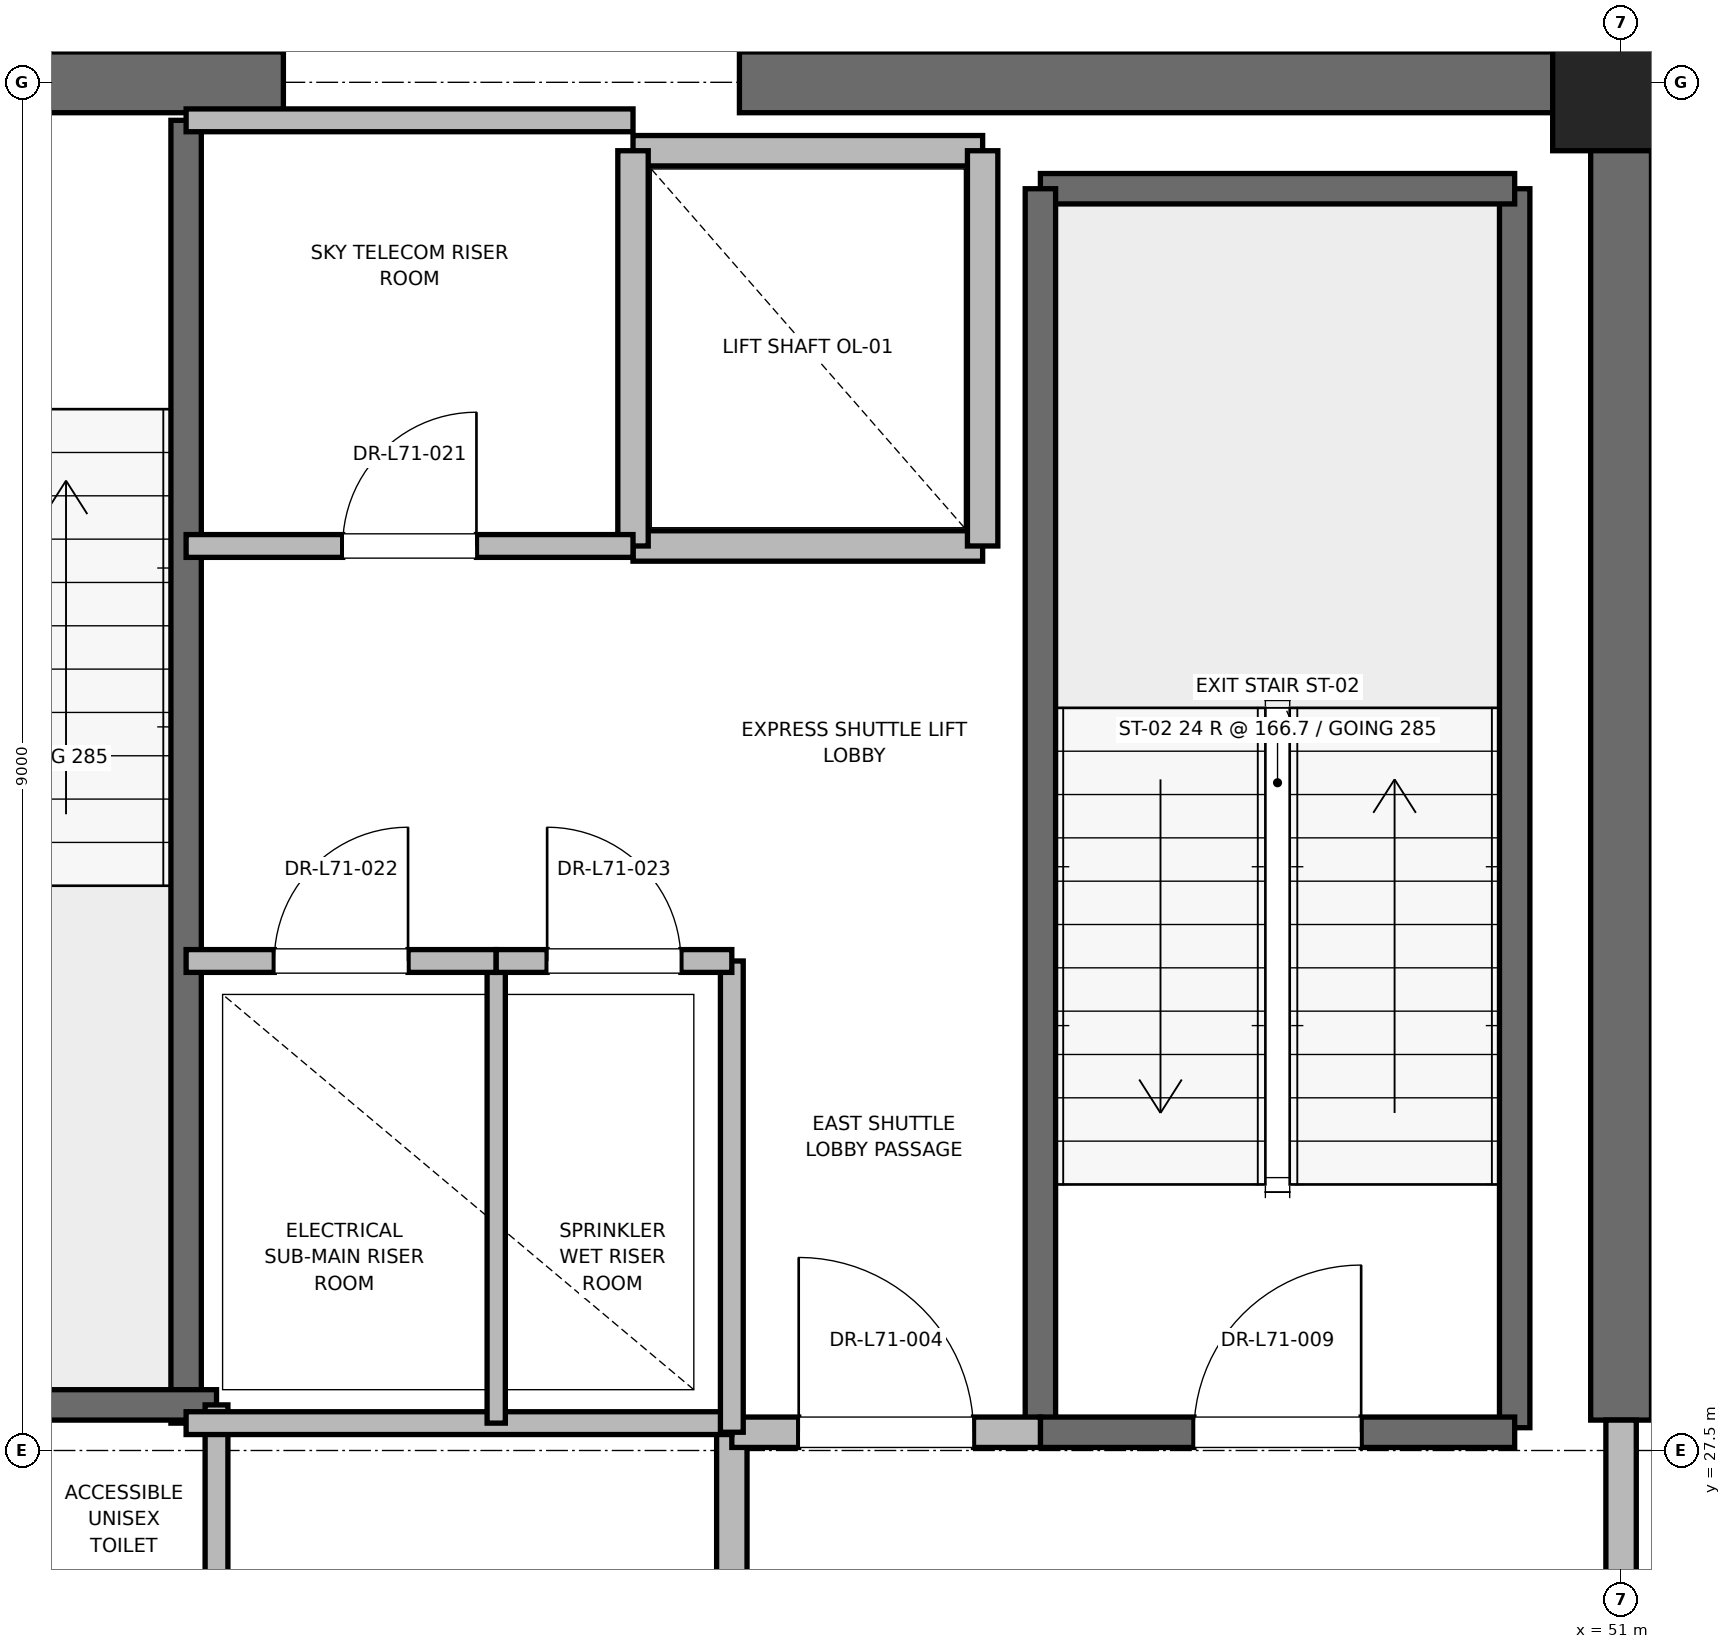
"""IFC4 building model, lengths in metres.
Left out: names, types, materials, properties, quantities, classifications, styles, units other than length and angle.
Written with IfcOpenShell. Run it as: python <this file> out.ifc"""

import sys

from ifc_helpers import new_model, si_unit, direction, frame, frame_2d, origin, origin_2d, place, context, subcontext, project, spatial, rectangle, extrude, element, fill, save


model = new_model("IFC4")
c1 = context("Model", 3, precision=1e-05, world=origin(), true_north=direction((0.0, 1.0)))
c2 = subcontext(c1, "Body", "Model", "MODEL_VIEW")
j1 = project(units=[si_unit("LENGTHUNIT", "METRE"), si_unit("PLANEANGLEUNIT", "RADIAN")], contexts=[c1])
p1 = place(None, origin())
s1 = spatial("IfcSite", under=j1, at=p1, CompositionType="ELEMENT")
p2 = place(p1, origin())
s2 = spatial("IfcBuilding", under=s1, at=p2, CompositionType="ELEMENT")
p3 = place(p2, frame((0.0, 0.0, 306.8)))
s3 = spatial("IfcBuildingStorey", under=s2, at=p3, CompositionType="ELEMENT", Elevation=306.8)
p4 = place(p3, frame((51.0, 36.5, 0.0), z_axis=(0.0, 0.0, 1.0), x_axis=(1.0, 0.0, 0.0)))
e1 = element("IfcColumn", 1, at=p4, inside=s3, PredefinedType="PILASTER", context=c2, shape_type="SweptSolid", body=[
    extrude(rectangle(XDim=0.9, YDim=0.9, at=origin_2d()), origin(), (0.0, 0.0, 1.0), 4.0),
])
p5 = place(p3, frame((37.8, 36.5, 0.0), z_axis=(0.0, 0.0, 1.0), x_axis=(1.0, 0.0, 0.0)))
e2 = element("IfcWall", 2, at=p5, inside=s3, PredefinedType="SHEAR", context=c2, shape_type="SweptSolid", body=[
    extrude(rectangle(XDim=4.4, YDim=0.4, at=frame_2d((2.2, 0.0))), origin(), (0.0, 0.0, 1.0), 3.785),
])
p6 = place(p5, frame((1.65, 0.0, 0.0)))
e3 = element("IfcOpeningElement", 3, at=p6, cuts=e2, PredefinedType="OPENING", context=c2, shape_type="SweptSolid", body=[
    extrude(rectangle(XDim=1.1, YDim=2.15, at=frame_2d((0.55, 1.075))), frame((0.0, 0.2, 0.0), z_axis=(0.0, -1.0, 0.0), x_axis=(1.0, 0.0, 0.0)), (0.0, 0.0, 1.0), 0.4),
])
p7 = place(p3, frame((45.2, 36.5, 0.0), z_axis=(0.0, 0.0, 1.0), x_axis=(1.0, 0.0, 0.0)))
e4 = element("IfcWall", 4, at=p7, inside=s3, PredefinedType="SHEAR", context=c2, shape_type="SweptSolid", body=[
    extrude(rectangle(XDim=5.8, YDim=0.4, at=frame_2d((2.9, 0.0))), origin(), (0.0, 0.0, 1.0), 3.785),
])
p8 = place(p3, frame((51.0, 27.7, 0.0), z_axis=(0.0, 0.0, 1.0), x_axis=(0.0, 1.0, 0.0)))
e5 = element("IfcWall", 5, at=p8, inside=s3, PredefinedType="SHEAR", context=c2, shape_type="SweptSolid", body=[
    extrude(rectangle(XDim=8.8, YDim=0.4, at=frame_2d((4.4, 0.0))), origin(), (0.0, 0.0, 1.0), 3.785),
])
p9 = place(p3, frame((50.3, 27.65, 0.0), z_axis=(0.0, 0.0, 1.0), x_axis=(0.0, 1.0, 0.0)))
e6 = element("IfcWall", 6, at=p9, inside=s3, PredefinedType="SOLIDWALL", context=c2, shape_type="SweptSolid", body=[
    extrude(rectangle(XDim=8.15, YDim=0.2, at=frame_2d((4.075, 0.0))), origin(), (0.0, 0.0, 1.0), 3.785),
])
p10 = place(p3, frame((47.18, 35.8, 0.0), z_axis=(0.0, 0.0, 1.0), x_axis=(1.0, 0.0, 0.0)))
e7 = element("IfcWall", 7, at=p10, inside=s3, PredefinedType="SOLIDWALL", context=c2, shape_type="SweptSolid", body=[
    extrude(rectangle(XDim=3.12, YDim=0.2, at=frame_2d((1.56, 0.0))), origin(), (0.0, 0.0, 1.0), 3.785),
])
p11 = place(p3, frame((47.18, 27.62, 0.0), z_axis=(0.0, 0.0, 1.0), x_axis=(0.0, 1.0, 0.0)))
e8 = element("IfcWall", 8, at=p11, inside=s3, PredefinedType="SOLIDWALL", context=c2, shape_type="SweptSolid", body=[
    extrude(rectangle(XDim=8.18, YDim=0.2, at=frame_2d((4.09, 0.0))), origin(), (0.0, 0.0, 1.0), 3.785),
])
p12 = place(p3, frame((47.18, 27.62, 0.0), z_axis=(0.0, 0.0, 1.0), x_axis=(1.0, 0.0, 0.0)))
e9 = element("IfcWall", 9, at=p12, inside=s3, PredefinedType="SOLIDWALL", context=c2, shape_type="SweptSolid", body=[
    extrude(rectangle(XDim=3.12, YDim=0.2, at=frame_2d((1.56, 0.0))), origin(), (0.0, 0.0, 1.0), 3.785),
])
p13 = place(p12, frame((1.01, 0.0, 0.0)))
e10 = element("IfcOpeningElement", 10, at=p13, cuts=e9, PredefinedType="OPENING", context=c2, shape_type="SweptSolid", body=[
    extrude(rectangle(XDim=1.1, YDim=2.15, at=frame_2d((0.55, 1.075))), frame((0.0, 0.1, 0.0), z_axis=(0.0, -1.0, 0.0), x_axis=(1.0, 0.0, 0.0)), (0.0, 0.0, 1.0), 0.2),
])
p14 = place(p3, frame((41.56, 27.68, 0.0), z_axis=(0.0, 0.0, 1.0), x_axis=(0.0, 1.0, 0.0)))
e11 = element("IfcWall", 11, at=p14, inside=s3, PredefinedType="SOLIDWALL", context=c2, shape_type="SweptSolid", body=[
    extrude(rectangle(XDim=8.57, YDim=0.2, at=frame_2d((4.285, 0.0))), origin(), (0.0, 0.0, 1.0), 3.785),
])
p15 = place(p3, frame((38.44, 27.8, 0.0), z_axis=(0.0, 0.0, 1.0), x_axis=(1.0, 0.0, 0.0)))
e12 = element("IfcWall", 12, at=p15, inside=s3, PredefinedType="SOLIDWALL", context=c2, shape_type="SweptSolid", body=[
    extrude(rectangle(XDim=3.32, YDim=0.2, at=frame_2d((1.66, 0.0))), origin(), (0.0, 0.0, 1.0), 3.785),
])
p16 = place(p3, frame((45.15, 24.25, 0.0), z_axis=(0.0, 0.0, 1.0), x_axis=(0.0, 1.0, 0.0)))
e13 = element("IfcWall", 13, at=p16, inside=s3, PredefinedType="PARTITIONING", context=c2, shape_type="SweptSolid", body=[
    extrude(rectangle(XDim=3.37, YDim=0.2, at=frame_2d((1.685, 0.0))), origin(), (0.0, 0.0, 1.0), 3.785),
])
p17 = place(p3, frame((45.15, 27.62, 0.0), z_axis=(0.0, 0.0, 1.0), x_axis=(1.0, 0.0, 0.0)))
e14 = element("IfcWall", 14, at=p17, inside=s3, PredefinedType="PARTITIONING", context=c2, shape_type="SweptSolid", body=[
    extrude(rectangle(XDim=2.03, YDim=0.2, at=frame_2d((1.015, 0.0))), origin(), (0.0, 0.0, 1.0), 3.785),
])
p18 = place(p17, frame((0.44, 0.0, 0.0)))
e15 = element("IfcOpeningElement", 15, at=p18, cuts=e14, PredefinedType="OPENING", context=c2, shape_type="SweptSolid", body=[
    extrude(rectangle(XDim=1.15, YDim=2.2, at=frame_2d((0.575, 1.1))), frame((0.0, 0.1, 0.0), z_axis=(0.0, -1.0, 0.0), x_axis=(1.0, 0.0, 0.0)), (0.0, 0.0, 1.0), 0.2),
])
p19 = place(p3, frame((51.0, 24.3, 0.0), z_axis=(0.0, 0.0, 1.0), x_axis=(0.0, 1.0, 0.0)))
e16 = element("IfcWall", 16, at=p19, inside=s3, PredefinedType="PARTITIONING", context=c2, shape_type="SweptSolid", body=[
    extrude(rectangle(XDim=3.4, YDim=0.2, at=frame_2d((1.7, 0.0))), origin(), (0.0, 0.0, 1.0), 2.865),
])
p20 = place(p19, frame((1.125, 0.0, 0.0)))
e17 = element("IfcOpeningElement", 17, at=p20, cuts=e16, PredefinedType="OPENING", context=c2, shape_type="SweptSolid", body=[
    extrude(rectangle(XDim=1.15, YDim=2.2, at=frame_2d((0.575, 1.1))), frame((0.0, 0.1, 0.0), z_axis=(0.0, -1.0, 0.0), x_axis=(1.0, 0.0, 0.0)), (0.0, 0.0, 1.0), 0.2),
])
p21 = place(p3, frame((44.5, 33.45, 0.0), z_axis=(0.0, 0.0, 1.0), x_axis=(1.0, 0.0, 0.0)))
e18 = element("IfcWall", 18, at=p21, inside=s3, PredefinedType="SOLIDWALL", context=c2, shape_type="SweptSolid", body=[
    extrude(rectangle(XDim=2.3, YDim=0.2, at=frame_2d((1.15, 0.0))), origin(), (0.0, 0.0, 1.0), 3.785),
])
p22 = place(p3, frame((46.8, 36.05, 0.0), z_axis=(0.0, 0.0, 1.0), x_axis=(-1.0, 0.0, 0.0)))
e19 = element("IfcWall", 19, at=p22, inside=s3, PredefinedType="SOLIDWALL", context=c2, shape_type="SweptSolid", body=[
    extrude(rectangle(XDim=2.3, YDim=0.2, at=frame_2d((1.15, 0.0))), origin(), (0.0, 0.0, 1.0), 2.865),
])
p23 = place(p3, frame((44.5, 36.05, 0.0), z_axis=(0.0, 0.0, 1.0), x_axis=(0.0, -1.0, 0.0)))
e20 = element("IfcWall", 20, at=p23, inside=s3, PredefinedType="SOLIDWALL", context=c2, shape_type="SweptSolid", body=[
    extrude(rectangle(XDim=2.6, YDim=0.2, at=frame_2d((1.3, 0.0))), origin(), (0.0, 0.0, 1.0), 2.865),
])
p24 = place(p3, frame((46.8, 33.45, 0.0), z_axis=(0.0, 0.0, 1.0), x_axis=(0.0, 1.0, 0.0)))
e21 = element("IfcWall", 21, at=p24, inside=s3, PredefinedType="SOLIDWALL", context=c2, shape_type="SweptSolid", body=[
    extrude(rectangle(XDim=2.6, YDim=0.2, at=frame_2d((1.3, 0.0))), origin(), (0.0, 0.0, 1.0), 3.785),
])
p25 = place(p3, frame((41.76, 23.8, 0.0), z_axis=(0.0, 0.0, 1.0), x_axis=(0.0, 1.0, 0.0)))
e22 = element("IfcWall", 22, at=p25, inside=s3, PredefinedType="PARTITIONING", context=c2, shape_type="SweptSolid", body=[
    extrude(rectangle(XDim=4.0, YDim=0.15, at=frame_2d((2.0, 0.0))), origin(), (0.0, 0.0, 1.0), 2.85),
])
p26 = place(p3, frame((41.56, 27.68, 0.0), z_axis=(0.0, 0.0, 1.0), x_axis=(1.0, 0.0, 0.0)))
e23 = element("IfcWall", 23, at=p26, inside=s3, PredefinedType="PARTITIONING", context=c2, shape_type="SweptSolid", body=[
    extrude(rectangle(XDim=3.59, YDim=0.15, at=frame_2d((1.795, 0.0))), origin(), (0.0, 0.0, 1.0), 2.85),
])
p27 = place(p3, frame((45.15, 27.62, 0.0), z_axis=(0.0, 0.0, 1.0), x_axis=(0.0, 1.0, 0.0)))
e24 = element("IfcWall", 24, at=p27, inside=s3, PredefinedType="PARTITIONING", context=c2, shape_type="SweptSolid", body=[
    extrude(rectangle(XDim=3.1, YDim=0.15, at=frame_2d((1.55, 0.0))), origin(), (0.0, 0.0, 1.0), 2.85),
])
p28 = place(p3, frame((43.6, 27.68, 0.0), z_axis=(0.0, 0.0, 1.0), x_axis=(0.0, 1.0, 0.0)))
e25 = element("IfcWall", 25, at=p28, inside=s3, PredefinedType="PARTITIONING", context=c2, shape_type="SweptSolid", body=[
    extrude(rectangle(XDim=3.04, YDim=0.12, at=frame_2d((1.52, 0.0))), origin(), (0.0, 0.0, 1.0), 2.85),
])
p29 = place(p3, frame((41.56, 30.72, 0.0), z_axis=(0.0, 0.0, 1.0), x_axis=(1.0, 0.0, 0.0)))
e26 = element("IfcWall", 26, at=p29, inside=s3, PredefinedType="PARTITIONING", context=c2, shape_type="SweptSolid", body=[
    extrude(rectangle(XDim=2.04, YDim=0.15, at=frame_2d((1.02, 0.0))), origin(), (0.0, 0.0, 1.0), 2.85),
])
p30 = place(p29, frame((0.58, 0.0, 0.0)))
e27 = element("IfcOpeningElement", 27, at=p30, cuts=e26, PredefinedType="OPENING", context=c2, shape_type="SweptSolid", body=[
    extrude(rectangle(XDim=0.88, YDim=2.1, at=frame_2d((0.44, 1.05))), frame((0.0, 0.075, 0.0), z_axis=(0.0, -1.0, 0.0), x_axis=(1.0, 0.0, 0.0)), (0.0, 0.0, 1.0), 0.15),
])
p31 = place(p3, frame((43.6, 30.72, 0.0), z_axis=(0.0, 0.0, 1.0), x_axis=(1.0, 0.0, 0.0)))
e28 = element("IfcWall", 28, at=p31, inside=s3, PredefinedType="PARTITIONING", context=c2, shape_type="SweptSolid", body=[
    extrude(rectangle(XDim=1.55, YDim=0.15, at=frame_2d((0.775, 0.0))), origin(), (0.0, 0.0, 1.0), 2.85),
])
p32 = place(p31, frame((0.335, 0.0, 0.0)))
e29 = element("IfcOpeningElement", 29, at=p32, cuts=e28, PredefinedType="OPENING", context=c2, shape_type="SweptSolid", body=[
    extrude(rectangle(XDim=0.88, YDim=2.1, at=frame_2d((0.44, 1.05))), frame((0.0, 0.075, 0.0), z_axis=(0.0, -1.0, 0.0), x_axis=(1.0, 0.0, 0.0)), (0.0, 0.0, 1.0), 0.15),
])
p33 = place(p3, frame((41.56, 36.25, 0.0), z_axis=(0.0, 0.0, 1.0), x_axis=(1.0, 0.0, 0.0)))
e30 = element("IfcWall", 30, at=p33, inside=s3, PredefinedType="PARTITIONING", context=c2, shape_type="SweptSolid", body=[
    extrude(rectangle(XDim=2.94, YDim=0.15, at=frame_2d((1.47, 0.0))), origin(), (0.0, 0.0, 1.0), 2.85),
])
p34 = place(p3, frame((41.56, 33.45, 0.0), z_axis=(0.0, 0.0, 1.0), x_axis=(1.0, 0.0, 0.0)))
e31 = element("IfcWall", 31, at=p34, inside=s3, PredefinedType="PARTITIONING", context=c2, shape_type="SweptSolid", body=[
    extrude(rectangle(XDim=2.94, YDim=0.15, at=frame_2d((1.47, 0.0))), origin(), (0.0, 0.0, 1.0), 2.85),
])
p35 = place(p34, frame((1.03, 0.0, 0.0)))
e32 = element("IfcOpeningElement", 32, at=p35, cuts=e31, PredefinedType="OPENING", context=c2, shape_type="SweptSolid", body=[
    extrude(rectangle(XDim=0.88, YDim=2.1, at=frame_2d((0.44, 1.05))), frame((0.0, 0.075, 0.0), z_axis=(0.0, -1.0, 0.0), x_axis=(1.0, 0.0, 0.0)), (0.0, 0.0, 1.0), 0.15),
])
p36 = place(p13, origin())
e33 = element("IfcDoor", 33, at=p36, inside=s3, OperationType="SINGLE_SWING_RIGHT", PredefinedType="DOOR", context=c2, shape_type="SweptSolid", body=[
    extrude(rectangle(XDim=1.1, YDim=2.15, at=frame_2d((0.55, 1.075))), frame((0.0, 0.025, 0.0), z_axis=(0.0, -1.0, 0.0), x_axis=(1.0, 0.0, 0.0)), (0.0, 0.0, 1.0), 0.05),
])
fill(e10, e33)
p37 = place(p18, origin())
e34 = element("IfcDoor", 34, at=p37, inside=s3, OperationType="SINGLE_SWING_LEFT", PredefinedType="DOOR", context=c2, shape_type="SweptSolid", body=[
    extrude(rectangle(XDim=1.15, YDim=2.2, at=frame_2d((0.575, 1.1))), frame((0.0, 0.025, 0.0), z_axis=(0.0, -1.0, 0.0), x_axis=(1.0, 0.0, 0.0)), (0.0, 0.0, 1.0), 0.05),
])
fill(e15, e34)
p38 = place(p30, origin())
e35 = element("IfcDoor", 35, at=p38, inside=s3, OperationType="SINGLE_SWING_RIGHT", PredefinedType="DOOR", context=c2, shape_type="SweptSolid", body=[
    extrude(rectangle(XDim=0.88, YDim=2.1, at=frame_2d((0.44, 1.05))), frame((0.0, 0.025, 0.0), z_axis=(0.0, -1.0, 0.0), x_axis=(1.0, 0.0, 0.0)), (0.0, 0.0, 1.0), 0.05),
])
fill(e27, e35)
p39 = place(p32, origin())
e36 = element("IfcDoor", 36, at=p39, inside=s3, OperationType="SINGLE_SWING_LEFT", PredefinedType="DOOR", context=c2, shape_type="SweptSolid", body=[
    extrude(rectangle(XDim=0.88, YDim=2.1, at=frame_2d((0.44, 1.05))), frame((0.0, 0.025, 0.0), z_axis=(0.0, -1.0, 0.0), x_axis=(1.0, 0.0, 0.0)), (0.0, 0.0, 1.0), 0.05),
])
fill(e29, e36)
p40 = place(p35, origin())
e37 = element("IfcDoor", 37, at=p40, inside=s3, OperationType="SINGLE_SWING_RIGHT", PredefinedType="DOOR", context=c2, shape_type="SweptSolid", body=[
    extrude(rectangle(XDim=0.88, YDim=2.1, at=frame_2d((0.44, 1.05))), frame((0.0, 0.025, 0.0), z_axis=(0.0, -1.0, 0.0), x_axis=(1.0, 0.0, 0.0)), (0.0, 0.0, 1.0), 0.05),
])
fill(e32, e37)
save(model, sys.argv[1])
